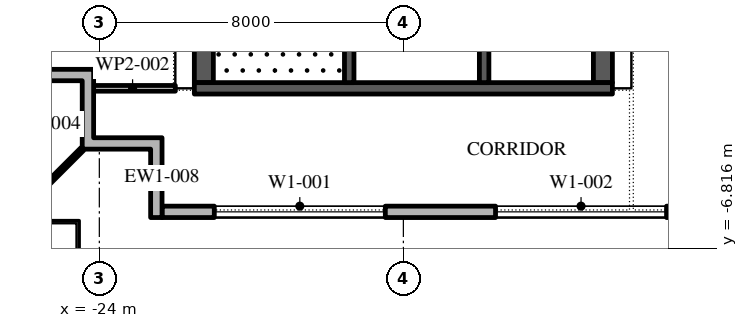
"""IFC4 building model, lengths in metres.
Left out: names, types, materials, properties, quantities, classifications, styles, units other than length and angle.
Written with IfcOpenShell. Run it as: python <this file> out.ifc"""

import sys

from ifc_helpers import new_model, si_unit, direction, frame, frame_2d, origin, place, context, subcontext, project, spatial, polyline, rectangle, outline, extrude, element, fill, save


model = new_model("IFC4")
c1 = context("Model", 3, precision=1e-05, world=origin(), true_north=direction((0.0, 1.0)))
c2 = subcontext(c1, "Body", "Model", "MODEL_VIEW")
j1 = project(units=[si_unit("LENGTHUNIT", "METRE"), si_unit("PLANEANGLEUNIT", "RADIAN")], contexts=[c1])
p1 = place(None, origin())
s1 = spatial("IfcSite", under=j1, at=p1, CompositionType="ELEMENT")
p2 = place(p1, origin())
s2 = spatial("IfcBuilding", under=s1, at=p2, CompositionType="ELEMENT")
p3 = place(p2, frame((0.0, 0.0, 321.6)))
s3 = spatial("IfcBuildingStorey", under=s2, at=p3, CompositionType="ELEMENT", Elevation=321.6)
p4 = place(p3, frame((-22.35, -5.85, 0.0), z_axis=(0.0, 0.0, 1.0), x_axis=(1.0, 0.0, 0.0)))
e1 = element("IfcWall", 1, at=p4, inside=s3, PredefinedType="STANDARD", context=c2, shape_type="SweptSolid", body=[
    extrude(rectangle(XDim=45.0, YDim=0.3, at=frame_2d((22.5, 0.0))), origin(), (0.0, 0.0, 1.0), 4.0),
])
p5 = place(p4, frame((1.375, 0.0, 0.45)))
e2 = element("IfcOpeningElement", 2, at=p5, cuts=e1, PredefinedType="OPENING", context=c2, shape_type="SweptSolid", body=[
    extrude(rectangle(XDim=4.5, YDim=3.05, at=frame_2d((2.25, 1.525))), frame((0.0, 0.16, 0.0), z_axis=(0.0, -1.0, 0.0), x_axis=(1.0, 0.0, 0.0)), (0.0, 0.0, 1.0), 0.32),
])
p6 = place(p4, frame((8.775, 0.0, 0.45)))
e3 = element("IfcOpeningElement", 3, at=p6, cuts=e1, PredefinedType="OPENING", context=c2, shape_type="SweptSolid", body=[
    extrude(rectangle(XDim=4.5, YDim=3.05, at=frame_2d((2.25, 1.525))), frame((0.0, 0.16, 0.0), z_axis=(0.0, -1.0, 0.0), x_axis=(1.0, 0.0, 0.0)), (0.0, 0.0, 1.0), 0.32),
])
p7 = place(p4, frame((17.375, 0.0, 0.0)))
e4 = element("IfcOpeningElement", 4, at=p7, cuts=e1, PredefinedType="OPENING", context=c2, shape_type="SweptSolid", body=[
    extrude(rectangle(XDim=2.4, YDim=3.5, at=frame_2d((1.2, 1.75))), frame((0.0, 0.16, 0.0), z_axis=(0.0, -1.0, 0.0), x_axis=(1.0, 0.0, 0.0)), (0.0, 0.0, 1.0), 0.32),
])
p8 = place(p4, frame((23.875, 0.0, 0.45)))
e5 = element("IfcOpeningElement", 5, at=p8, cuts=e1, PredefinedType="OPENING", context=c2, shape_type="SweptSolid", body=[
    extrude(rectangle(XDim=4.5, YDim=3.05, at=frame_2d((2.25, 1.525))), frame((0.0, 0.16, 0.0), z_axis=(0.0, -1.0, 0.0), x_axis=(1.0, 0.0, 0.0)), (0.0, 0.0, 1.0), 0.32),
])
p9 = place(p4, frame((31.425, 0.0, 0.45)))
e6 = element("IfcOpeningElement", 6, at=p9, cuts=e1, PredefinedType="OPENING", context=c2, shape_type="SweptSolid", body=[
    extrude(rectangle(XDim=4.5, YDim=3.05, at=frame_2d((2.25, 1.525))), frame((0.0, 0.16, 0.0), z_axis=(0.0, -1.0, 0.0), x_axis=(1.0, 0.0, 0.0)), (0.0, 0.0, 1.0), 0.32),
])
p10 = place(p4, frame((38.975, 0.0, 0.45)))
e7 = element("IfcOpeningElement", 7, at=p10, cuts=e1, PredefinedType="OPENING", context=c2, shape_type="SweptSolid", body=[
    extrude(rectangle(XDim=4.5, YDim=3.05, at=frame_2d((2.25, 1.525))), frame((0.0, 0.16, 0.0), z_axis=(0.0, -1.0, 0.0), x_axis=(1.0, 0.0, 0.0)), (0.0, 0.0, 1.0), 0.32),
])
p11 = place(p3, origin())
e8 = element("IfcWall", 8, at=p11, inside=s3, PredefinedType="STANDARD", context=c2, shape_type="SweptSolid", body=[
    extrude(outline(polyline([(-22.65, -4.2), (-24.45, -4.2), (-24.45, -2.4), (-25.95, -2.4), (-25.95, -2.1), (-24.15, -2.1), (-24.15, -3.9), (-22.35, -3.9), (-22.35, -6.0), (-22.65, -6.0), (-22.65, -4.2)])), origin(), (0.0, 0.0, 1.0), 4.0),
])
p12 = place(p3, frame((-24.45, -4.2, -0.05), z_axis=(0.0, 0.0, 1.0), x_axis=(-0.707106781187, -0.707106781187, 0.0)))
e9 = element("IfcWall", 9, at=p12, inside=s3, PredefinedType="STANDARD", context=c2, shape_type="SweptSolid", body=[
    extrude(rectangle(XDim=2.667, YDim=0.1, at=frame_2d((1.333, 0.0))), origin(), (0.0, 0.0, 1.0), 4.05),
])
p13 = place(p3, frame((-21.25, -2.45, 0.0), z_axis=(0.0, 0.0, 1.0), x_axis=(0.0, 1.0, 0.0)))
e10 = element("IfcWall", 10, at=p13, inside=s3, PredefinedType="SHEAR", context=c2, shape_type="SweptSolid", body=[
    extrude(rectangle(XDim=27.9, YDim=0.5, at=frame_2d((13.95, 0.0))), origin(), (0.0, 0.0, 1.0), 4.0),
])
p14 = place(p13, frame((5.05, 0.0, 0.0)))
e11 = element("IfcOpeningElement", 11, at=p14, cuts=e10, PredefinedType="OPENING", context=c2, shape_type="SweptSolid", body=[
    extrude(rectangle(XDim=1.2, YDim=2.1, at=frame_2d((0.6, 1.05))), frame((0.0, 0.26, 0.0), z_axis=(0.0, -1.0, 0.0), x_axis=(1.0, 0.0, 0.0)), (0.0, 0.0, 1.0), 0.52),
])
p15 = place(p13, frame((21.65, 0.0, 0.0)))
e12 = element("IfcOpeningElement", 12, at=p15, cuts=e10, PredefinedType="OPENING", context=c2, shape_type="SweptSolid", body=[
    extrude(rectangle(XDim=1.2, YDim=2.1, at=frame_2d((0.6, 1.05))), frame((0.0, 0.26, 0.0), z_axis=(0.0, -1.0, 0.0), x_axis=(1.0, 0.0, 0.0)), (0.0, 0.0, 1.0), 0.52),
])
p16 = place(p3, frame((-10.75, -2.45, 0.0), z_axis=(0.0, 0.0, 1.0), x_axis=(0.0, 1.0, 0.0)))
e13 = element("IfcWall", 13, at=p16, inside=s3, PredefinedType="SHEAR", context=c2, shape_type="SweptSolid", body=[
    extrude(rectangle(XDim=27.9, YDim=0.5, at=frame_2d((13.95, 0.0))), origin(), (0.0, 0.0, 1.0), 4.0),
])
p17 = place(p16, frame((23.65, 0.0, 0.0)))
e14 = element("IfcOpeningElement", 14, at=p17, cuts=e13, PredefinedType="OPENING", context=c2, shape_type="SweptSolid", body=[
    extrude(rectangle(XDim=2.4, YDim=2.1, at=frame_2d((1.2, 1.05))), frame((0.0, 0.26, 0.0), z_axis=(0.0, -1.0, 0.0), x_axis=(1.0, 0.0, 0.0)), (0.0, 0.0, 1.0), 0.52),
])
p18 = place(p16, frame((1.387, 0.0, 0.0)))
e15 = element("IfcOpeningElement", 15, at=p18, cuts=e13, PredefinedType="OPENING", context=c2, shape_type="SweptSolid", body=[
    extrude(rectangle(XDim=0.9, YDim=2.1, at=frame_2d((0.45, 1.05))), frame((0.0, 0.26, 0.0), z_axis=(0.0, -1.0, 0.0), x_axis=(1.0, 0.0, 0.0)), (0.0, 0.0, 1.0), 0.52),
])
p19 = place(p16, frame((4.562, 0.0, 0.0)))
e16 = element("IfcOpeningElement", 16, at=p19, cuts=e13, PredefinedType="OPENING", context=c2, shape_type="SweptSolid", body=[
    extrude(rectangle(XDim=1.0, YDim=2.1, at=frame_2d((0.5, 1.05))), frame((0.0, 0.26, 0.0), z_axis=(0.0, -1.0, 0.0), x_axis=(1.0, 0.0, 0.0)), (0.0, 0.0, 1.0), 0.52),
])
p20 = place(p3, frame((-21.5, -2.6, 0.0), z_axis=(0.0, 0.0, 1.0), x_axis=(1.0, 0.0, 0.0)))
e17 = element("IfcWall", 17, at=p20, inside=s3, PredefinedType="SHEAR", context=c2, shape_type="SweptSolid", body=[
    extrude(rectangle(XDim=11.0, YDim=0.3, at=frame_2d((5.5, 0.0))), origin(), (0.0, 0.0, 1.0), 4.0),
])
p21 = place(p3, frame((-17.425, -2.45, 0.0), z_axis=(0.0, 0.0, 1.0), x_axis=(0.0, 1.0, 0.0)))
e18 = element("IfcWall", 18, at=p21, inside=s3, PredefinedType="SHEAR", context=c2, shape_type="SweptSolid", body=[
    extrude(rectangle(XDim=6.3, YDim=0.25, at=frame_2d((3.15, 0.0))), origin(), (0.0, 0.0, 1.0), 4.0),
])
p22 = place(p21, frame((5.05, 0.0, 0.0)))
e19 = element("IfcOpeningElement", 19, at=p22, cuts=e18, PredefinedType="OPENING", context=c2, shape_type="SweptSolid", body=[
    extrude(rectangle(XDim=1.2, YDim=2.1, at=frame_2d((0.6, 1.05))), frame((0.0, 0.135, 0.0), z_axis=(0.0, -1.0, 0.0), x_axis=(1.0, 0.0, 0.0)), (0.0, 0.0, 1.0), 0.27),
])
p23 = place(p3, frame((-13.875, -2.45, 0.0), z_axis=(0.0, 0.0, 1.0), x_axis=(0.0, 1.0, 0.0)))
e20 = element("IfcWall", 20, at=p23, inside=s3, PredefinedType="SHEAR", context=c2, shape_type="SweptSolid", body=[
    extrude(rectangle(XDim=21.3, YDim=0.25, at=frame_2d((10.65, 0.0))), origin(), (0.0, 0.0, 1.0), 4.0),
])
p24 = place(p23, frame((9.846, 0.0, 0.0)))
e21 = element("IfcOpeningElement", 21, at=p24, cuts=e20, PredefinedType="OPENING", context=c2, shape_type="SweptSolid", body=[
    extrude(rectangle(XDim=0.9, YDim=2.1, at=frame_2d((0.45, 1.05))), frame((0.0, 0.135, 0.0), z_axis=(0.0, -1.0, 0.0), x_axis=(1.0, 0.0, 0.0)), (0.0, 0.0, 1.0), 0.27),
])
p25 = place(p23, frame((12.911, 0.0, 0.0)))
e22 = element("IfcOpeningElement", 22, at=p25, cuts=e20, PredefinedType="OPENING", context=c2, shape_type="SweptSolid", body=[
    extrude(rectangle(XDim=0.9, YDim=2.1, at=frame_2d((0.45, 1.05))), frame((0.0, 0.135, 0.0), z_axis=(0.0, -1.0, 0.0), x_axis=(1.0, 0.0, 0.0)), (0.0, 0.0, 1.0), 0.27),
])
p26 = place(p23, frame((6.971, 0.0, 0.0)))
e23 = element("IfcOpeningElement", 23, at=p26, cuts=e20, PredefinedType="OPENING", context=c2, shape_type="SweptSolid", body=[
    extrude(rectangle(XDim=1.1, YDim=2.1, at=frame_2d((0.55, 1.05))), frame((0.0, 0.135, 0.0), z_axis=(0.0, -1.0, 0.0), x_axis=(1.0, 0.0, 0.0)), (0.0, 0.0, 1.0), 0.27),
])
p27 = place(p23, frame((15.543, 0.0, 0.0)))
e24 = element("IfcOpeningElement", 24, at=p27, cuts=e20, PredefinedType="OPENING", context=c2, shape_type="SweptSolid", body=[
    extrude(rectangle(XDim=1.1, YDim=2.1, at=frame_2d((0.55, 1.05))), frame((0.0, 0.135, 0.0), z_axis=(0.0, -1.0, 0.0), x_axis=(1.0, 0.0, 0.0)), (0.0, 0.0, 1.0), 0.27),
])
p28 = place(p23, frame((17.686, 0.0, 0.0)))
e25 = element("IfcOpeningElement", 25, at=p28, cuts=e20, PredefinedType="OPENING", context=c2, shape_type="SweptSolid", body=[
    extrude(rectangle(XDim=1.1, YDim=2.1, at=frame_2d((0.55, 1.05))), frame((0.0, 0.135, 0.0), z_axis=(0.0, -1.0, 0.0), x_axis=(1.0, 0.0, 0.0)), (0.0, 0.0, 1.0), 0.27),
])
p29 = place(p23, frame((19.829, 0.0, 0.0)))
e26 = element("IfcOpeningElement", 26, at=p29, cuts=e20, PredefinedType="OPENING", context=c2, shape_type="SweptSolid", body=[
    extrude(rectangle(XDim=1.1, YDim=2.1, at=frame_2d((0.55, 1.05))), frame((0.0, 0.135, 0.0), z_axis=(0.0, -1.0, 0.0), x_axis=(1.0, 0.0, 0.0)), (0.0, 0.0, 1.0), 0.27),
])
p30 = place(p3, frame((-24.25, -2.6, 0.0), z_axis=(0.0, 0.0, 1.0), x_axis=(1.0, 0.0, 0.0)))
e27 = element("IfcWall", 27, at=p30, inside=s3, PredefinedType="PARTITIONING", context=c2, shape_type="SweptSolid", body=[
    extrude(rectangle(XDim=2.25, YDim=0.15, at=frame_2d((1.125, 0.0))), origin(), (0.0, 0.0, 1.0), 4.0),
])
p31 = place(p5, origin())
e28 = element("IfcWindow", 28, at=p31, inside=s3, PartitioningType="DOUBLE_PANEL_VERTICAL", PredefinedType="WINDOW", context=c2, shape_type="SweptSolid", body=[
    extrude(rectangle(XDim=4.5, YDim=3.05, at=frame_2d((2.25, 1.525))), frame((0.0, 0.03, 0.0), z_axis=(0.0, -1.0, 0.0), x_axis=(1.0, 0.0, 0.0)), (0.0, 0.0, 1.0), 0.06),
])
fill(e2, e28)
p32 = place(p6, origin())
e29 = element("IfcWindow", 29, at=p32, inside=s3, PartitioningType="DOUBLE_PANEL_VERTICAL", PredefinedType="WINDOW", context=c2, shape_type="SweptSolid", body=[
    extrude(rectangle(XDim=4.5, YDim=3.05, at=frame_2d((2.25, 1.525))), frame((0.0, 0.03, 0.0), z_axis=(0.0, -1.0, 0.0), x_axis=(1.0, 0.0, 0.0)), (0.0, 0.0, 1.0), 0.06),
])
fill(e3, e29)
save(model, sys.argv[1])
